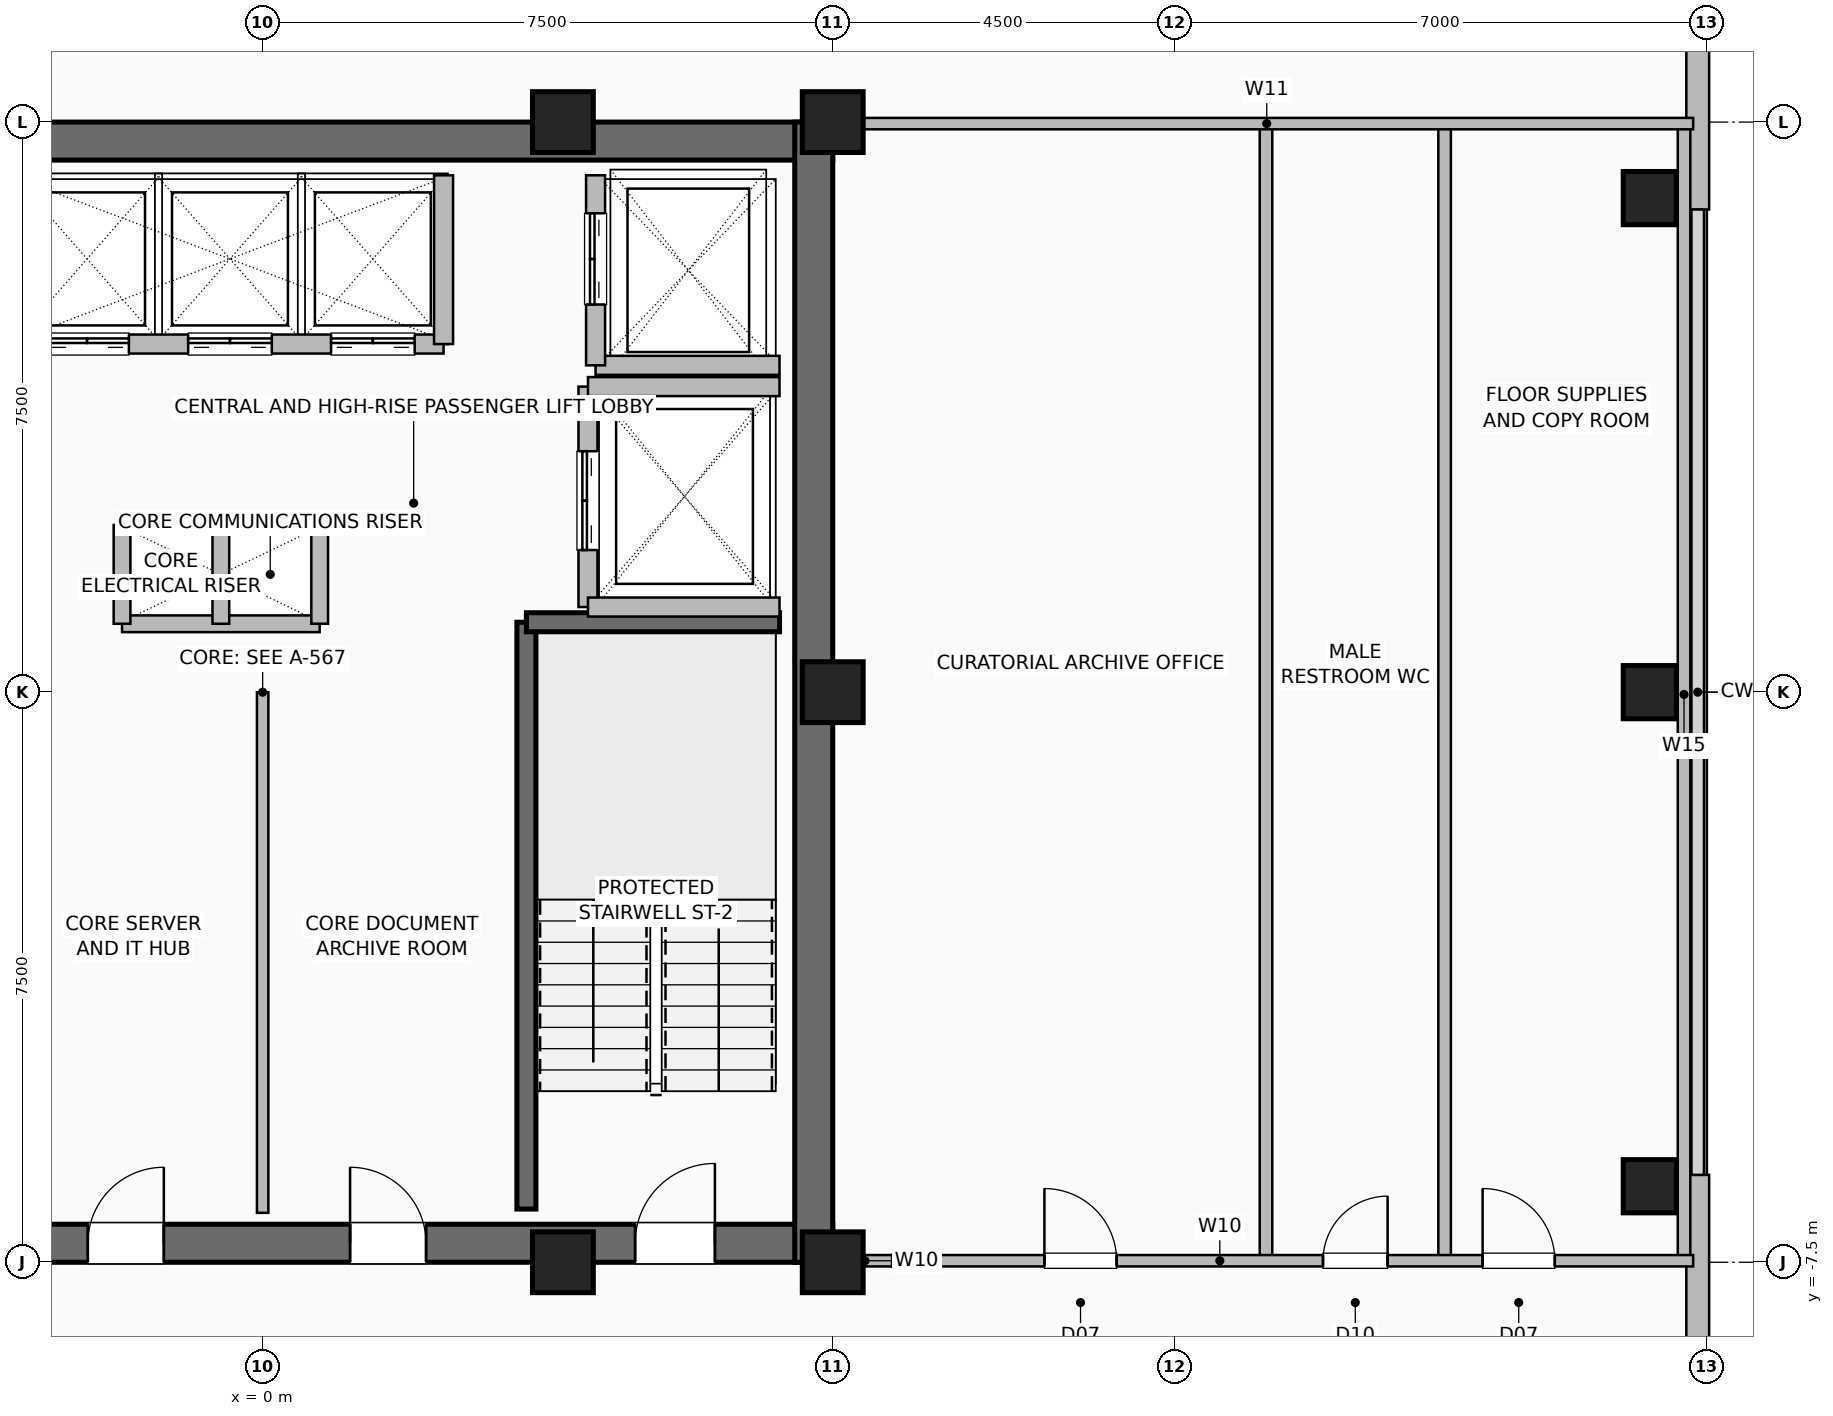
"""IFC4 building model, lengths in metres.
Left out: names, types, materials, properties, quantities, classifications, styles, units other than length and angle.
Written with IfcOpenShell. Run it as: python <this file> out.ifc"""

import sys

from ifc_helpers import new_model, si_unit, direction, frame, frame_2d, origin, origin_2d, place, context, subcontext, project, spatial, rectangle, hollow_rectangle, extrude, element, fill, save


model = new_model("IFC4")
c1 = context("Model", 3, precision=1e-05, world=origin(), true_north=direction((0.0, 1.0)))
c2 = subcontext(c1, "Body", "Model", "MODEL_VIEW")
j1 = project(units=[si_unit("LENGTHUNIT", "METRE"), si_unit("PLANEANGLEUNIT", "RADIAN")], contexts=[c1])
p1 = place(None, origin())
s1 = spatial("IfcSite", under=j1, at=p1, CompositionType="ELEMENT")
p2 = place(p1, origin())
s2 = spatial("IfcBuilding", under=s1, at=p2, CompositionType="ELEMENT")
p3 = place(p2, frame((0.0, 0.0, 268.4)))
s3 = spatial("IfcBuildingStorey", under=s2, at=p3, CompositionType="ELEMENT", Elevation=268.4)
for number, where, z_axis, x_axis in (
    (1, (3.95, -7.5, 0.0), (0.0, 0.0, 1.0), (1.0, 0.0, 0.0)),
    (2, (7.5, -7.5, 0.0), (0.0, 0.0, 1.0), (1.0, 0.0, 0.0)),
    (3, (7.5, 0.0, 0.0), (0.0, 0.0, 1.0), (1.0, 0.0, 0.0)),
    (4, (7.5, 7.5, 0.0), (0.0, 0.0, 1.0), (1.0, 0.0, 0.0)),
    (5, (3.95, 7.5, 0.0), (0.0, 0.0, 1.0), (1.0, 0.0, 0.0)),
):
    element("IfcColumn", number, at=place(p3, frame(where, z_axis=z_axis, x_axis=x_axis)), inside=s3, PredefinedType="COLUMN", context=c2, shape_type="SweptSolid", body=[
        extrude(hollow_rectangle(XDim=0.8, YDim=0.8, WallThickness=0.04, at=origin_2d()), origin(), (0.0, 0.0, 1.0), 3.6),
    ])
for number, where, z_axis, x_axis in (
    (6, (18.25, -6.5, 0.0), (0.0, 0.0, 1.0), (1.0, 0.0, 0.0)),
    (7, (18.25, 0.0, 0.0), (0.0, 0.0, 1.0), (1.0, 0.0, 0.0)),
    (8, (18.25, 6.5, 0.0), (0.0, 0.0, 1.0), (1.0, 0.0, 0.0)),
):
    element("IfcColumn", number, at=place(p3, frame(where, z_axis=z_axis, x_axis=x_axis)), inside=s3, PredefinedType="COLUMN", context=c2, shape_type="SweptSolid", body=[
        extrude(hollow_rectangle(XDim=0.7, YDim=0.7, WallThickness=0.035, at=origin_2d()), origin(), (0.0, 0.0, 1.0), 3.6),
    ])
for number, where, z_axis, x_axis in (
    (9, (18.88, -11.65, 0.0), (0.0, 0.0, 1.0), (0.0, 1.0, 0.0)),
    (10, (18.88, 6.35, 0.0), (0.0, 0.0, 1.0), (0.0, 1.0, 0.0)),
):
    element("IfcWall", number, at=place(p3, frame(where, z_axis=z_axis, x_axis=x_axis)), inside=s3, PredefinedType="SOLIDWALL", context=c2, shape_type="SweptSolid", body=[
        extrude(rectangle(XDim=5.3, YDim=0.3, at=frame_2d((2.65, 0.0))), origin(), (0.0, 0.0, 1.0), 3.36),
    ])
p4 = place(p3, frame((-7.5, -7.25, 0.0), z_axis=(0.0, 0.0, 1.0), x_axis=(1.0, 0.0, 0.0)))
e11 = element("IfcWall", 11, at=p4, inside=s3, PredefinedType="SHEAR", context=c2, shape_type="SweptSolid", body=[
    extrude(rectangle(XDim=15.0, YDim=0.5, at=frame_2d((7.5, 0.0))), origin(), (0.0, 0.0, 1.0), 3.36),
])
p5 = place(p4, frame((1.55, 0.0, 0.0)))
e12 = element("IfcOpeningElement", 12, at=p5, cuts=e11, PredefinedType="OPENING", context=c2, shape_type="SweptSolid", body=[
    extrude(rectangle(XDim=1.05, YDim=2.08, at=frame_2d((0.525, 1.04))), frame((0.0, 0.26, 0.0), z_axis=(0.0, -1.0, 0.0), x_axis=(1.0, 0.0, 0.0)), (0.0, 0.0, 1.0), 0.52),
])
p6 = place(p4, frame((12.4, 0.0, 0.0)))
e13 = element("IfcOpeningElement", 13, at=p6, cuts=e11, PredefinedType="OPENING", context=c2, shape_type="SweptSolid", body=[
    extrude(rectangle(XDim=1.05, YDim=2.08, at=frame_2d((0.525, 1.04))), frame((0.0, 0.26, 0.0), z_axis=(0.0, -1.0, 0.0), x_axis=(1.0, 0.0, 0.0)), (0.0, 0.0, 1.0), 0.52),
])
p7 = place(p4, frame((5.2, 0.0, 0.0)))
e14 = element("IfcOpeningElement", 14, at=p7, cuts=e11, PredefinedType="OPENING", context=c2, shape_type="SweptSolid", body=[
    extrude(rectangle(XDim=1.0, YDim=2.08, at=frame_2d((0.5, 1.04))), frame((0.0, 0.26, 0.0), z_axis=(0.0, -1.0, 0.0), x_axis=(1.0, 0.0, 0.0)), (0.0, 0.0, 1.0), 0.52),
])
p8 = place(p4, frame((8.65, 0.0, 0.0)))
e15 = element("IfcOpeningElement", 15, at=p8, cuts=e11, PredefinedType="OPENING", context=c2, shape_type="SweptSolid", body=[
    extrude(rectangle(XDim=1.0, YDim=2.08, at=frame_2d((0.5, 1.04))), frame((0.0, 0.26, 0.0), z_axis=(0.0, -1.0, 0.0), x_axis=(1.0, 0.0, 0.0)), (0.0, 0.0, 1.0), 0.52),
])
for number, where, z_axis, x_axis in (
    (16, (-7.5, 7.25, 0.0), (0.0, 0.0, 1.0), (1.0, 0.0, 0.0)),
    (17, (7.25, -7.5, 0.0), (0.0, 0.0, 1.0), (0.0, 1.0, 0.0)),
):
    element("IfcWall", number, at=place(p3, frame(where, z_axis=z_axis, x_axis=x_axis)), inside=s3, PredefinedType="SHEAR", context=c2, shape_type="SweptSolid", body=[
        extrude(rectangle(XDim=15.0, YDim=0.5, at=frame_2d((7.5, 0.0))), origin(), (0.0, 0.0, 1.0), 3.36),
    ])
p9 = place(p3, frame((3.47, -6.8, 0.0), z_axis=(0.0, 0.0, 1.0), x_axis=(0.0, 1.0, 0.0)))
e18 = element("IfcWall", 18, at=p9, inside=s3, PredefinedType="SHEAR", context=c2, shape_type="SweptSolid", body=[
    extrude(rectangle(XDim=7.72, YDim=0.25, at=frame_2d((3.86, 0.0))), origin(), (0.0, 0.0, 1.0), 3.36),
])
p10 = place(p3, frame((3.47, 0.92, 0.0), z_axis=(0.0, 0.0, 1.0), x_axis=(1.0, 0.0, 0.0)))
e19 = element("IfcWall", 19, at=p10, inside=s3, PredefinedType="SHEAR", context=c2, shape_type="SweptSolid", body=[
    extrude(rectangle(XDim=3.33, YDim=0.25, at=frame_2d((1.665, 0.0))), origin(), (0.0, 0.0, 1.0), 3.36),
])
for number, where, z_axis, x_axis in (
    (20, (-1.85, 2.2, 0.0), (0.0, 0.0, 1.0), (1.0, 0.0, 0.0)),
    (21, (-1.85, 0.9, 0.0), (0.0, 0.0, 1.0), (1.0, 0.0, 0.0)),
):
    element("IfcWall", number, at=place(p3, frame(where, z_axis=z_axis, x_axis=x_axis)), inside=s3, PredefinedType="PARTITIONING", context=c2, shape_type="SweptSolid", body=[
        extrude(rectangle(XDim=2.6, YDim=0.22, at=frame_2d((1.3, 0.0))), origin(), (0.0, 0.0, 1.0), 3.36),
    ])
for number, where, z_axis, x_axis in (
    (22, (-0.55, 0.9, 0.0), (0.0, 0.0, 1.0), (0.0, 1.0, 0.0)),
    (23, (0.75, 0.9, 0.0), (0.0, 0.0, 1.0), (0.0, 1.0, 0.0)),
    (24, (-1.85, 0.9, 0.0), (0.0, 0.0, 1.0), (0.0, 1.0, 0.0)),
):
    element("IfcWall", number, at=place(p3, frame(where, z_axis=z_axis, x_axis=x_axis)), inside=s3, PredefinedType="PARTITIONING", context=c2, shape_type="SweptSolid", body=[
        extrude(rectangle(XDim=1.3, YDim=0.22, at=frame_2d((0.65, 0.0))), origin(), (0.0, 0.0, 1.0), 3.36),
    ])
p11 = place(p3, frame((-3.26, 4.58, 0.0), z_axis=(0.0, 0.0, 1.0), x_axis=(1.0, 0.0, 0.0)))
e25 = element("IfcWall", 25, at=p11, inside=s3, PredefinedType="SHEAR", context=c2, shape_type="SweptSolid", body=[
    extrude(rectangle(XDim=5.64, YDim=0.25, at=frame_2d((2.82, 0.0))), origin(), (0.0, 0.0, 1.0), 3.36),
])
p12 = place(p11, frame((0.4, 0.0, 0.0)))
e26 = element("IfcOpeningElement", 26, at=p12, cuts=e25, PredefinedType="OPENING", context=c2, shape_type="SweptSolid", body=[
    extrude(rectangle(XDim=1.1, YDim=2.2, at=frame_2d((0.55, 1.1))), frame((0.0, 0.135, 0.0), z_axis=(0.0, -1.0, 0.0), x_axis=(1.0, 0.0, 0.0)), (0.0, 0.0, 1.0), 0.27),
])
p13 = place(p11, frame((2.28, 0.0, 0.0)))
e27 = element("IfcOpeningElement", 27, at=p13, cuts=e25, PredefinedType="OPENING", context=c2, shape_type="SweptSolid", body=[
    extrude(rectangle(XDim=1.1, YDim=2.2, at=frame_2d((0.55, 1.1))), frame((0.0, 0.135, 0.0), z_axis=(0.0, -1.0, 0.0), x_axis=(1.0, 0.0, 0.0)), (0.0, 0.0, 1.0), 0.27),
])
p14 = place(p11, frame((4.16, 0.0, 0.0)))
e28 = element("IfcOpeningElement", 28, at=p14, cuts=e25, PredefinedType="OPENING", context=c2, shape_type="SweptSolid", body=[
    extrude(rectangle(XDim=1.1, YDim=2.2, at=frame_2d((0.55, 1.1))), frame((0.0, 0.135, 0.0), z_axis=(0.0, -1.0, 0.0), x_axis=(1.0, 0.0, 0.0)), (0.0, 0.0, 1.0), 0.27),
])
p15 = place(p3, frame((2.38, 4.58, 0.0), z_axis=(0.0, 0.0, 1.0), x_axis=(0.0, 1.0, 0.0)))
e29 = element("IfcWall", 29, at=p15, inside=s3, PredefinedType="SHEAR", context=c2, shape_type="SweptSolid", body=[
    extrude(rectangle(XDim=2.22, YDim=0.25, at=frame_2d((1.11, 0.0))), origin(), (0.0, 0.0, 1.0), 3.36),
])
p16 = place(p3, frame((4.38, 4.3, 0.0), z_axis=(0.0, 0.0, 1.0), x_axis=(1.0, 0.0, 0.0)))
e30 = element("IfcWall", 30, at=p16, inside=s3, PredefinedType="SHEAR", context=c2, shape_type="SweptSolid", body=[
    extrude(rectangle(XDim=2.42, YDim=0.25, at=frame_2d((1.21, 0.0))), origin(), (0.0, 0.0, 1.0), 3.36),
])
p17 = place(p3, frame((4.38, 4.3, 0.0), z_axis=(0.0, 0.0, 1.0), x_axis=(0.0, 1.0, 0.0)))
e31 = element("IfcWall", 31, at=p17, inside=s3, PredefinedType="SHEAR", context=c2, shape_type="SweptSolid", body=[
    extrude(rectangle(XDim=2.5, YDim=0.25, at=frame_2d((1.25, 0.0))), origin(), (0.0, 0.0, 1.0), 3.36),
])
p18 = place(p17, frame((0.8, 0.0, 0.0)))
e32 = element("IfcOpeningElement", 32, at=p18, cuts=e31, PredefinedType="OPENING", context=c2, shape_type="SweptSolid", body=[
    extrude(rectangle(XDim=1.2, YDim=2.2, at=frame_2d((0.6, 1.1))), frame((0.0, 0.135, 0.0), z_axis=(0.0, -1.0, 0.0), x_axis=(1.0, 0.0, 0.0)), (0.0, 0.0, 1.0), 0.27),
])
p19 = place(p3, frame((4.28, 1.12, 0.0), z_axis=(0.0, 0.0, 1.0), x_axis=(0.0, 1.0, 0.0)))
e33 = element("IfcWall", 33, at=p19, inside=s3, PredefinedType="SHEAR", context=c2, shape_type="SweptSolid", body=[
    extrude(rectangle(XDim=2.9, YDim=0.25, at=frame_2d((1.45, 0.0))), origin(), (0.0, 0.0, 1.0), 3.36),
])
p20 = place(p19, frame((0.75, 0.0, 0.0)))
e34 = element("IfcOpeningElement", 34, at=p20, cuts=e33, PredefinedType="OPENING", context=c2, shape_type="SweptSolid", body=[
    extrude(rectangle(XDim=1.3, YDim=2.3, at=frame_2d((0.65, 1.15))), frame((0.0, 0.135, 0.0), z_axis=(0.0, -1.0, 0.0), x_axis=(1.0, 0.0, 0.0)), (0.0, 0.0, 1.0), 0.27),
])
for number, where, z_axis, x_axis in (
    (35, (4.28, 1.12, 0.0), (0.0, 0.0, 1.0), (1.0, 0.0, 0.0)),
    (36, (4.28, 4.02, 0.0), (0.0, 0.0, 1.0), (1.0, 0.0, 0.0)),
):
    element("IfcWall", number, at=place(p3, frame(where, z_axis=z_axis, x_axis=x_axis)), inside=s3, PredefinedType="SHEAR", context=c2, shape_type="SweptSolid", body=[
        extrude(rectangle(XDim=2.52, YDim=0.25, at=frame_2d((1.26, 0.0))), origin(), (0.0, 0.0, 1.0), 3.36),
    ])
p21 = place(p3, frame((0.0, -6.85, 0.0), z_axis=(0.0, 0.0, 1.0), x_axis=(0.0, 1.0, 0.0)))
e37 = element("IfcWall", 37, at=p21, inside=s3, PredefinedType="PARTITIONING", context=c2, shape_type="SweptSolid", body=[
    extrude(rectangle(XDim=6.85, YDim=0.15, at=frame_2d((3.425, 0.0))), origin(), (0.0, 0.0, 1.0), 3.36),
])
p22 = place(p3, frame((7.45, -7.48, 0.0), z_axis=(0.0, 0.0, 1.0), x_axis=(1.0, 0.0, 0.0)))
e38 = element("IfcWall", 38, at=p22, inside=s3, PredefinedType="PARTITIONING", context=c2, shape_type="SweptSolid", body=[
    extrude(rectangle(XDim=0.95, YDim=0.15, at=frame_2d((0.475, 0.0))), origin(), (0.0, 0.0, 1.0), 3.36),
])
for number, where, z_axis, x_axis in (
    (39, (15.55, -7.48, 0.0), (0.0, 0.0, 1.0), (0.0, 1.0, 0.0)),
    (40, (13.2, -7.48, 0.0), (0.0, 0.0, 1.0), (0.0, 1.0, 0.0)),
    (41, (18.7, -7.48, 0.0), (0.0, 0.0, 1.0), (0.0, 1.0, 0.0)),
):
    element("IfcWall", number, at=place(p3, frame(where, z_axis=z_axis, x_axis=x_axis)), inside=s3, PredefinedType="PLUMBINGWALL", context=c2, shape_type="SweptSolid", body=[
        extrude(rectangle(XDim=14.9, YDim=0.165, at=frame_2d((7.45, 0.0))), origin(), (0.0, 0.0, 1.0), 3.36),
    ])
p23 = place(p3, frame((8.28, -7.48, 0.0), z_axis=(0.0, 0.0, 1.0), x_axis=(1.0, 0.0, 0.0)))
e42 = element("IfcWall", 42, at=p23, inside=s3, PredefinedType="PARTITIONING", context=c2, shape_type="SweptSolid", body=[
    extrude(rectangle(XDim=10.54, YDim=0.15, at=frame_2d((5.27, 0.0))), origin(), (0.0, 0.0, 1.0), 3.36),
])
p24 = place(p23, frame((2.005, 0.0, 0.0)))
e43 = element("IfcOpeningElement", 43, at=p24, cuts=e42, PredefinedType="OPENING", context=c2, shape_type="SweptSolid", body=[
    extrude(rectangle(XDim=0.95, YDim=2.06, at=frame_2d((0.475, 1.03))), frame((0.0, 0.085, 0.0), z_axis=(0.0, -1.0, 0.0), x_axis=(1.0, 0.0, 0.0)), (0.0, 0.0, 1.0), 0.17),
])
p25 = place(p23, frame((5.67, 0.0, 0.0)))
e44 = element("IfcOpeningElement", 44, at=p25, cuts=e42, PredefinedType="OPENING", context=c2, shape_type="SweptSolid", body=[
    extrude(rectangle(XDim=0.85, YDim=2.05, at=frame_2d((0.425, 1.025))), frame((0.0, 0.085, 0.0), z_axis=(0.0, -1.0, 0.0), x_axis=(1.0, 0.0, 0.0)), (0.0, 0.0, 1.0), 0.17),
])
p26 = place(p23, frame((7.77, 0.0, 0.0)))
e45 = element("IfcOpeningElement", 45, at=p26, cuts=e42, PredefinedType="OPENING", context=c2, shape_type="SweptSolid", body=[
    extrude(rectangle(XDim=0.95, YDim=2.06, at=frame_2d((0.475, 1.03))), frame((0.0, 0.085, 0.0), z_axis=(0.0, -1.0, 0.0), x_axis=(1.0, 0.0, 0.0)), (0.0, 0.0, 1.0), 0.17),
])
p27 = place(p3, frame((7.6, 7.48, 0.0), z_axis=(0.0, 0.0, 1.0), x_axis=(1.0, 0.0, 0.0)))
e46 = element("IfcWall", 46, at=p27, inside=s3, PredefinedType="PARTITIONING", context=c2, shape_type="SweptSolid", body=[
    extrude(rectangle(XDim=11.22, YDim=0.15, at=frame_2d((5.61, 0.0))), origin(), (0.0, 0.0, 1.0), 3.36),
])
p28 = place(p6, origin())
e47 = element("IfcDoor", 47, at=p28, inside=s3, OperationType="SINGLE_SWING_RIGHT", PredefinedType="DOOR", context=c2, shape_type="SweptSolid", body=[
    extrude(rectangle(XDim=1.05, YDim=2.08, at=frame_2d((0.525, 1.04))), frame((0.0, 0.025, 0.0), z_axis=(0.0, -1.0, 0.0), x_axis=(1.0, 0.0, 0.0)), (0.0, 0.0, 1.0), 0.05),
])
fill(e13, e47)
p29 = place(p7, origin())
e48 = element("IfcDoor", 48, at=p29, inside=s3, OperationType="SINGLE_SWING_RIGHT", PredefinedType="DOOR", context=c2, shape_type="SweptSolid", body=[
    extrude(rectangle(XDim=1.0, YDim=2.08, at=frame_2d((0.5, 1.04))), frame((0.0, 0.025, 0.0), z_axis=(0.0, -1.0, 0.0), x_axis=(1.0, 0.0, 0.0)), (0.0, 0.0, 1.0), 0.05),
])
fill(e14, e48)
p30 = place(p8, origin())
e49 = element("IfcDoor", 49, at=p30, inside=s3, OperationType="SINGLE_SWING_LEFT", PredefinedType="DOOR", context=c2, shape_type="SweptSolid", body=[
    extrude(rectangle(XDim=1.0, YDim=2.08, at=frame_2d((0.5, 1.04))), frame((0.0, 0.025, 0.0), z_axis=(0.0, -1.0, 0.0), x_axis=(1.0, 0.0, 0.0)), (0.0, 0.0, 1.0), 0.05),
])
fill(e15, e49)
p31 = place(p12, origin())
e50 = element("IfcDoor", 50, at=p31, inside=s3, OperationType="DOUBLE_DOOR_SLIDING", PredefinedType="DOOR", context=c2, shape_type="SweptSolid", body=[
    extrude(rectangle(XDim=1.1, YDim=2.2, at=frame_2d((0.55, 1.1))), frame((0.0, 0.025, 0.0), z_axis=(0.0, -1.0, 0.0), x_axis=(1.0, 0.0, 0.0)), (0.0, 0.0, 1.0), 0.05),
])
fill(e26, e50)
p32 = place(p13, origin())
e51 = element("IfcDoor", 51, at=p32, inside=s3, OperationType="DOUBLE_DOOR_SLIDING", PredefinedType="DOOR", context=c2, shape_type="SweptSolid", body=[
    extrude(rectangle(XDim=1.1, YDim=2.2, at=frame_2d((0.55, 1.1))), frame((0.0, 0.025, 0.0), z_axis=(0.0, -1.0, 0.0), x_axis=(1.0, 0.0, 0.0)), (0.0, 0.0, 1.0), 0.05),
])
fill(e27, e51)
p33 = place(p14, origin())
e52 = element("IfcDoor", 52, at=p33, inside=s3, OperationType="DOUBLE_DOOR_SLIDING", PredefinedType="DOOR", context=c2, shape_type="SweptSolid", body=[
    extrude(rectangle(XDim=1.1, YDim=2.2, at=frame_2d((0.55, 1.1))), frame((0.0, 0.025, 0.0), z_axis=(0.0, -1.0, 0.0), x_axis=(1.0, 0.0, 0.0)), (0.0, 0.0, 1.0), 0.05),
])
fill(e28, e52)
p34 = place(p18, origin())
e53 = element("IfcDoor", 53, at=p34, inside=s3, OperationType="DOUBLE_DOOR_SLIDING", PredefinedType="DOOR", context=c2, shape_type="SweptSolid", body=[
    extrude(rectangle(XDim=1.2, YDim=2.2, at=frame_2d((0.6, 1.1))), frame((0.0, 0.025, 0.0), z_axis=(0.0, -1.0, 0.0), x_axis=(1.0, 0.0, 0.0)), (0.0, 0.0, 1.0), 0.05),
])
fill(e32, e53)
p35 = place(p20, origin())
e54 = element("IfcDoor", 54, at=p35, inside=s3, OperationType="DOUBLE_DOOR_SLIDING", PredefinedType="DOOR", context=c2, shape_type="SweptSolid", body=[
    extrude(rectangle(XDim=1.3, YDim=2.3, at=frame_2d((0.65, 1.15))), frame((0.0, 0.025, 0.0), z_axis=(0.0, -1.0, 0.0), x_axis=(1.0, 0.0, 0.0)), (0.0, 0.0, 1.0), 0.05),
])
fill(e34, e54)
p36 = place(p24, origin())
e55 = element("IfcDoor", 55, at=p36, inside=s3, OperationType="SINGLE_SWING_LEFT", PredefinedType="DOOR", context=c2, shape_type="SweptSolid", body=[
    extrude(rectangle(XDim=0.95, YDim=2.06, at=frame_2d((0.475, 1.03))), frame((0.0, 0.025, 0.0), z_axis=(0.0, -1.0, 0.0), x_axis=(1.0, 0.0, 0.0)), (0.0, 0.0, 1.0), 0.05),
])
fill(e43, e55)
p37 = place(p25, origin())
e56 = element("IfcDoor", 56, at=p37, inside=s3, OperationType="SINGLE_SWING_RIGHT", PredefinedType="DOOR", context=c2, shape_type="SweptSolid", body=[
    extrude(rectangle(XDim=0.85, YDim=2.05, at=frame_2d((0.425, 1.025))), frame((0.0, 0.025, 0.0), z_axis=(0.0, -1.0, 0.0), x_axis=(1.0, 0.0, 0.0)), (0.0, 0.0, 1.0), 0.05),
])
fill(e44, e56)
p38 = place(p26, origin())
e57 = element("IfcDoor", 57, at=p38, inside=s3, OperationType="SINGLE_SWING_LEFT", PredefinedType="DOOR", context=c2, shape_type="SweptSolid", body=[
    extrude(rectangle(XDim=0.95, YDim=2.06, at=frame_2d((0.475, 1.03))), frame((0.0, 0.025, 0.0), z_axis=(0.0, -1.0, 0.0), x_axis=(1.0, 0.0, 0.0)), (0.0, 0.0, 1.0), 0.05),
])
fill(e45, e57)
save(model, sys.argv[1])
